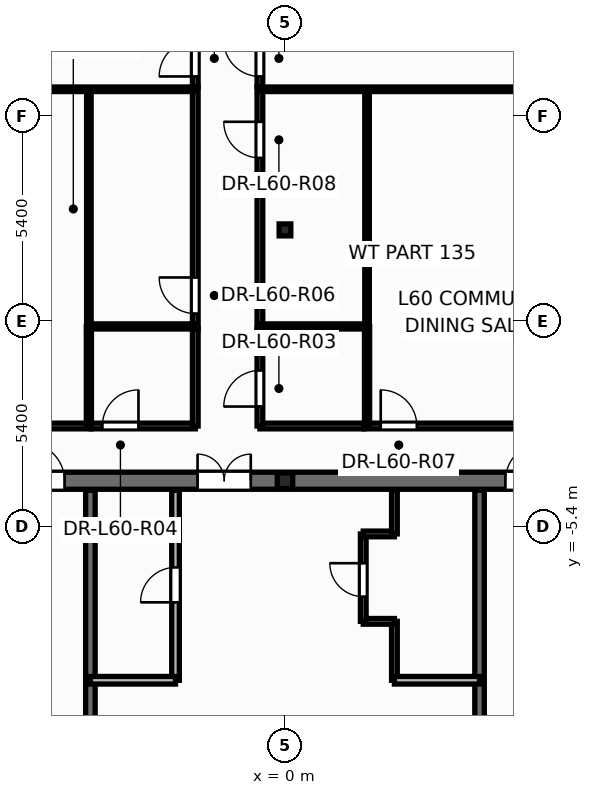
"""IFC4 building model, lengths in metres.
Left out: names, types, materials, properties, quantities, classifications, styles, units other than length and angle.
Written with IfcOpenShell. Run it as: python <this file> out.ifc"""

import sys

from ifc_helpers import new_model, si_unit, direction, frame, frame_2d, origin, origin_2d, place, context, subcontext, project, spatial, rectangle, i_section, extrude, element, fill, save


model = new_model("IFC4")
c1 = context("Model", 3, precision=1e-05, world=origin(), true_north=direction((0.0, 1.0)))
c2 = subcontext(c1, "Body", "Model", "MODEL_VIEW")
j1 = project(units=[si_unit("LENGTHUNIT", "METRE"), si_unit("PLANEANGLEUNIT", "RADIAN")], contexts=[c1])
p1 = place(None, origin())
s1 = spatial("IfcSite", under=j1, at=p1, CompositionType="ELEMENT")
p2 = place(p1, origin())
s2 = spatial("IfcBuilding", under=s1, at=p2, CompositionType="ELEMENT")
p3 = place(p2, frame((0.0, 0.0, 228.9)))
s3 = spatial("IfcBuildingStorey", under=s2, at=p3, CompositionType="ELEMENT", Elevation=228.9)
p4 = place(p3, frame((0.0, -4.2, 0.0), z_axis=(0.0, 0.0, 1.0), x_axis=(1.0, 0.0, 0.0)))
e1 = element("IfcColumn", 1, at=p4, inside=s3, PredefinedType="PILASTER", context=c2, shape_type="SweptSolid", body=[
    extrude(i_section(OverallWidth=0.405, OverallDepth=0.414, WebThickness=0.022, FlangeThickness=0.032, at=origin_2d()), origin(), (0.0, 0.0, 1.0), 4.5),
])
p5 = place(p3, frame((0.0, 2.4, 0.0), z_axis=(0.0, 0.0, 1.0), x_axis=(1.0, 0.0, 0.0)))
e2 = element("IfcColumn", 2, at=p5, inside=s3, PredefinedType="COLUMN", context=c2, shape_type="SweptSolid", body=[
    extrude(i_section(OverallWidth=0.307, OverallDepth=0.314, WebThickness=0.012, FlangeThickness=0.019, at=origin_2d()), origin(), (0.0, 0.0, 1.0), 4.5),
])
p6 = place(p3, frame((12.33, 0.896, -0.2), z_axis=(0.0, 0.0, 1.0), x_axis=(-0.583103601817, 0.812397802526, 0.0)))
e3 = element("IfcWall", 3, at=p6, inside=s3, PredefinedType="PARAPET", context=c2, shape_type="SweptSolid", body=[
    extrude(rectangle(XDim=15.574, YDim=0.36, at=frame_2d((7.787, 0.0))), origin(), (0.0, 0.0, 1.0), 0.38),
])
p7 = place(p3, frame((-3.248, 13.549, -0.2), z_axis=(0.0, 0.0, 1.0), x_axis=(-0.583104007924, -0.81239751104, 0.0)))
e4 = element("IfcWall", 4, at=p7, inside=s3, PredefinedType="PARAPET", context=c2, shape_type="SweptSolid", body=[
    extrude(rectangle(XDim=12.38, YDim=0.36, at=frame_2d((6.19, 0.0))), origin(), (0.0, 0.0, 1.0), 0.38),
])
p8 = place(p3, frame((2.88, -9.45, 0.0), z_axis=(0.0, 0.0, 1.0), x_axis=(0.0, 1.0, 0.0)))
e5 = element("IfcWall", 5, at=p8, inside=s3, PredefinedType="PARTITIONING", context=c2, shape_type="SweptSolid", body=[
    extrude(rectangle(XDim=1.55, YDim=0.15, at=frame_2d((0.775, 0.0))), origin(), (0.0, 0.0, 1.0), 4.245),
])
p9 = place(p3, frame((2.06, -7.9, 0.0), z_axis=(0.0, 0.0, 1.0), x_axis=(1.0, 0.0, 0.0)))
e6 = element("IfcWall", 6, at=p9, inside=s3, PredefinedType="PARTITIONING", context=c2, shape_type="SweptSolid", body=[
    extrude(rectangle(XDim=0.82, YDim=0.15, at=frame_2d((0.41, 0.0))), origin(), (0.0, 0.0, 1.0), 4.245),
])
p10 = place(p3, frame((2.06, -7.9, 0.0), z_axis=(0.0, 0.0, 1.0), x_axis=(0.0, 1.0, 0.0)))
e7 = element("IfcWall", 7, at=p10, inside=s3, PredefinedType="PARTITIONING", context=c2, shape_type="SweptSolid", body=[
    extrude(rectangle(XDim=2.3, YDim=0.15, at=frame_2d((1.15, 0.0))), origin(), (0.0, 0.0, 1.0), 4.245),
])
p11 = place(p10, frame((0.65, 0.0, 0.0)))
e8 = element("IfcOpeningElement", 8, at=p11, cuts=e7, PredefinedType="OPENING", context=c2, shape_type="SweptSolid", body=[
    extrude(rectangle(XDim=0.886, YDim=2.104, at=frame_2d((0.44, 1.052))), frame((0.0, 0.085, 0.0), z_axis=(0.0, -1.0, 0.0), x_axis=(1.0, 0.0, 0.0)), (0.0, 0.0, 1.0), 0.17),
])
p12 = place(p3, frame((2.06, -5.6, 0.0), z_axis=(0.0, 0.0, 1.0), x_axis=(1.0, 0.0, 0.0)))
e9 = element("IfcWall", 9, at=p12, inside=s3, PredefinedType="PARTITIONING", context=c2, shape_type="SweptSolid", body=[
    extrude(rectangle(XDim=0.82, YDim=0.15, at=frame_2d((0.41, 0.0))), origin(), (0.0, 0.0, 1.0), 4.245),
])
p13 = place(p3, frame((2.88, -5.6, 0.0), z_axis=(0.0, 0.0, 1.0), x_axis=(0.0, 1.0, 0.0)))
e10 = element("IfcWall", 10, at=p13, inside=s3, PredefinedType="PARTITIONING", context=c2, shape_type="SweptSolid", body=[
    extrude(rectangle(XDim=1.15, YDim=0.15, at=frame_2d((0.575, 0.0))), origin(), (0.0, 0.0, 1.0), 4.245),
])
p14 = place(p3, frame((-12.65, -4.2, 0.0), z_axis=(0.0, 0.0, 1.0), x_axis=(1.0, 0.0, 0.0)))
e11 = element("IfcWall", 11, at=p14, inside=s3, PredefinedType="SHEAR", context=c2, shape_type="SweptSolid", body=[
    extrude(rectangle(XDim=25.3, YDim=0.45, at=frame_2d((12.65, 0.0))), origin(), (0.0, 0.0, 1.0), 4.5),
])
p15 = place(p14, frame((1.85, 0.0, 0.0)))
e12 = element("IfcOpeningElement", 12, at=p15, cuts=e11, PredefinedType="OPENING", context=c2, shape_type="SweptSolid", body=[
    extrude(rectangle(XDim=0.756, YDim=2.054, at=frame_2d((0.375, 1.027))), frame((0.0, 0.235, 0.0), z_axis=(0.0, -1.0, 0.0), x_axis=(1.0, 0.0, 0.0)), (0.0, 0.0, 1.0), 0.47),
])
p16 = place(p14, frame((22.65, 0.0, 0.0)))
e13 = element("IfcOpeningElement", 13, at=p16, cuts=e11, PredefinedType="OPENING", context=c2, shape_type="SweptSolid", body=[
    extrude(rectangle(XDim=0.756, YDim=2.054, at=frame_2d((0.375, 1.027))), frame((0.0, 0.235, 0.0), z_axis=(0.0, -1.0, 0.0), x_axis=(1.0, 0.0, 0.0)), (0.0, 0.0, 1.0), 0.47),
])
p17 = place(p14, frame((5.85, 0.0, 0.0)))
e14 = element("IfcOpeningElement", 14, at=p17, cuts=e11, PredefinedType="OPENING", context=c2, shape_type="SweptSolid", body=[
    extrude(rectangle(XDim=1.006, YDim=2.104, at=frame_2d((0.5, 1.052))), frame((0.0, 0.235, 0.0), z_axis=(0.0, -1.0, 0.0), x_axis=(1.0, 0.0, 0.0)), (0.0, 0.0, 1.0), 0.47),
])
p18 = place(p14, frame((10.35, 0.0, 0.0)))
e15 = element("IfcOpeningElement", 15, at=p18, cuts=e11, PredefinedType="OPENING", context=c2, shape_type="SweptSolid", body=[
    extrude(rectangle(XDim=1.406, YDim=2.154, at=frame_2d((0.7, 1.077))), frame((0.0, 0.235, 0.0), z_axis=(0.0, -1.0, 0.0), x_axis=(1.0, 0.0, 0.0)), (0.0, 0.0, 1.0), 0.47),
])
p19 = place(p14, frame((18.45, 0.0, 0.0)))
e16 = element("IfcOpeningElement", 16, at=p19, cuts=e11, PredefinedType="OPENING", context=c2, shape_type="SweptSolid", body=[
    extrude(rectangle(XDim=1.006, YDim=2.104, at=frame_2d((0.5, 1.052))), frame((0.0, 0.235, 0.0), z_axis=(0.0, -1.0, 0.0), x_axis=(1.0, 0.0, 0.0)), (0.0, 0.0, 1.0), 0.47),
])
for number, where, z_axis, x_axis in (
    (17, (-5.12, -13.85, 0.0), (0.0, 0.0, 1.0), (0.0, 1.0, 0.0)),
    (18, (5.12, -13.85, 0.0), (0.0, 0.0, 1.0), (0.0, 1.0, 0.0)),
):
    element("IfcWall", number, at=place(p3, frame(where, z_axis=z_axis, x_axis=x_axis)), inside=s3, PredefinedType="SHEAR", context=c2, shape_type="SweptSolid", body=[
        extrude(rectangle(XDim=9.4, YDim=0.25, at=frame_2d((4.7, 0.0))), origin(), (0.0, 0.0, 1.0), 4.5),
    ])
p20 = place(p3, frame((-2.88, -9.45, 0.0), z_axis=(0.0, 0.0, 1.0), x_axis=(0.0, 1.0, 0.0)))
e19 = element("IfcWall", 19, at=p20, inside=s3, PredefinedType="SOLIDWALL", context=c2, shape_type="SweptSolid", body=[
    extrude(rectangle(XDim=5.0, YDim=0.2, at=frame_2d((2.5, 0.0))), origin(), (0.0, 0.0, 1.0), 4.245),
])
p21 = place(p20, frame((2.05, 0.0, 0.0)))
e20 = element("IfcOpeningElement", 20, at=p21, cuts=e19, PredefinedType="OPENING", context=c2, shape_type="SweptSolid", body=[
    extrude(rectangle(XDim=0.926, YDim=2.104, at=frame_2d((0.46, 1.052))), frame((0.0, 0.11, 0.0), z_axis=(0.0, -1.0, 0.0), x_axis=(1.0, 0.0, 0.0)), (0.0, 0.0, 1.0), 0.22),
])
for number, where, z_axis, x_axis in (
    (21, (-5.12, -9.45, 0.0), (0.0, 0.0, 1.0), (1.0, 0.0, 0.0)),
    (22, (2.88, -9.45, 0.0), (0.0, 0.0, 1.0), (1.0, 0.0, 0.0)),
):
    element("IfcWall", number, at=place(p3, frame(where, z_axis=z_axis, x_axis=x_axis)), inside=s3, PredefinedType="SOLIDWALL", context=c2, shape_type="SweptSolid", body=[
        extrude(rectangle(XDim=2.24, YDim=0.2, at=frame_2d((1.12, 0.0))), origin(), (0.0, 0.0, 1.0), 4.245),
    ])
p22 = place(p3, frame((2.08, -2.76, 0.0), z_axis=(0.0, 0.0, 1.0), x_axis=(1.0, 0.0, 0.0)))
e23 = element("IfcWall", 23, at=p22, inside=s3, PredefinedType="PARTITIONING", context=c2, shape_type="SweptSolid", body=[
    extrude(rectangle(XDim=12.677, YDim=0.15, at=frame_2d((6.339, 0.0))), origin(), (0.0, 0.0, 1.0), 3.22),
])
p23 = place(p22, frame((0.44, 0.0, 0.0)))
e24 = element("IfcOpeningElement", 24, at=p23, cuts=e23, PredefinedType="OPENING", context=c2, shape_type="SweptSolid", body=[
    extrude(rectangle(XDim=0.956, YDim=2.104, at=frame_2d((0.475, 1.052))), frame((0.0, 0.085, 0.0), z_axis=(0.0, -1.0, 0.0), x_axis=(1.0, 0.0, 0.0)), (0.0, 0.0, 1.0), 0.17),
])
p24 = place(p3, frame((-14.757, -2.76, 0.0), z_axis=(0.0, 0.0, 1.0), x_axis=(1.0, 0.0, 0.0)))
e25 = element("IfcWall", 25, at=p24, inside=s3, PredefinedType="PARTITIONING", context=c2, shape_type="SweptSolid", body=[
    extrude(rectangle(XDim=9.657, YDim=0.15, at=frame_2d((4.829, 0.0))), origin(), (0.0, 0.0, 1.0), 3.22),
])
p25 = place(p24, frame((3.885, 0.0, 0.0)))
e26 = element("IfcOpeningElement", 26, at=p25, cuts=e25, PredefinedType="OPENING", context=c2, shape_type="SweptSolid", body=[
    extrude(rectangle(XDim=0.956, YDim=2.104, at=frame_2d((0.475, 1.052))), frame((0.0, 0.085, 0.0), z_axis=(0.0, -1.0, 0.0), x_axis=(1.0, 0.0, 0.0)), (0.0, 0.0, 1.0), 0.17),
])
p26 = place(p3, frame((-2.36, -0.2, 0.0), z_axis=(0.0, 0.0, 1.0), x_axis=(0.0, 1.0, 0.0)))
e27 = element("IfcWall", 27, at=p26, inside=s3, PredefinedType="PARTITIONING", context=c2, shape_type="SweptSolid", body=[
    extrude(rectangle(XDim=6.36, YDim=0.15, at=frame_2d((3.18, 0.0))), origin(), (0.0, 0.0, 1.0), 3.22),
])
p27 = place(p26, frame((0.398, 0.0, 0.0)))
e28 = element("IfcOpeningElement", 28, at=p27, cuts=e27, PredefinedType="OPENING", context=c2, shape_type="SweptSolid", body=[
    extrude(rectangle(XDim=0.956, YDim=2.104, at=frame_2d((0.475, 1.052))), frame((0.0, 0.085, 0.0), z_axis=(0.0, -1.0, 0.0), x_axis=(1.0, 0.0, 0.0)), (0.0, 0.0, 1.0), 0.17),
])
p28 = place(p3, frame((-0.66, -0.2, 0.0), z_axis=(0.0, 0.0, 1.0), x_axis=(0.0, 1.0, 0.0)))
e29 = element("IfcWall", 29, at=p28, inside=s3, PredefinedType="PARTITIONING", context=c2, shape_type="SweptSolid", body=[
    extrude(rectangle(XDim=6.36, YDim=0.15, at=frame_2d((3.18, 0.0))), origin(), (0.0, 0.0, 1.0), 3.22),
])
p29 = place(p28, frame((4.495, 0.0, 0.0)))
e30 = element("IfcOpeningElement", 30, at=p29, cuts=e29, PredefinedType="OPENING", context=c2, shape_type="SweptSolid", body=[
    extrude(rectangle(XDim=0.956, YDim=2.104, at=frame_2d((0.475, 1.052))), frame((0.0, 0.085, 0.0), z_axis=(0.0, -1.0, 0.0), x_axis=(1.0, 0.0, 0.0)), (0.0, 0.0, 1.0), 0.17),
])
for number, where, z_axis, x_axis in (
    (31, (-5.16, -0.2, 0.0), (0.0, 0.0, 1.0), (0.0, 1.0, 0.0)),
    (32, (2.16, -0.2, 0.0), (0.0, 0.0, 1.0), (0.0, 1.0, 0.0)),
):
    element("IfcWall", number, at=place(p3, frame(where, z_axis=z_axis, x_axis=x_axis)), inside=s3, PredefinedType="PARTITIONING", context=c2, shape_type="SweptSolid", body=[
        extrude(rectangle(XDim=6.3, YDim=0.12, at=frame_2d((3.15, 0.0))), origin(), (0.0, 0.0, 1.0), 3.22),
    ])
p30 = place(p3, frame((-0.66, 6.1, 0.0), z_axis=(0.0, 0.0, 1.0), x_axis=(1.0, 0.0, 0.0)))
e33 = element("IfcWall", 33, at=p30, inside=s3, PredefinedType="PARTITIONING", context=c2, shape_type="SweptSolid", body=[
    extrude(rectangle(XDim=9.058, YDim=0.12, at=frame_2d((4.529, 0.0))), origin(), (0.0, 0.0, 1.0), 3.22),
])
p31 = place(p3, frame((-8.398, 6.1, 0.0), z_axis=(0.0, 0.0, 1.0), x_axis=(1.0, 0.0, 0.0)))
e34 = element("IfcWall", 34, at=p31, inside=s3, PredefinedType="PARTITIONING", context=c2, shape_type="SweptSolid", body=[
    extrude(rectangle(XDim=6.038, YDim=0.12, at=frame_2d((3.019, 0.0))), origin(), (0.0, 0.0, 1.0), 3.22),
])
p32 = place(p3, frame((-0.66, -2.76, 0.0), z_axis=(0.0, 0.0, 1.0), x_axis=(1.0, 0.0, 0.0)))
e35 = element("IfcWall", 35, at=p32, inside=s3, PredefinedType="PARTITIONING", context=c2, shape_type="SweptSolid", body=[
    extrude(rectangle(XDim=2.738, YDim=0.15, at=frame_2d((1.369, 0.0))), origin(), (0.0, 0.0, 1.0), 3.22),
])
p33 = place(p3, frame((-5.098, -2.76, 0.0), z_axis=(0.0, 0.0, 1.0), x_axis=(1.0, 0.0, 0.0)))
e36 = element("IfcWall", 36, at=p33, inside=s3, PredefinedType="PARTITIONING", context=c2, shape_type="SweptSolid", body=[
    extrude(rectangle(XDim=2.738, YDim=0.15, at=frame_2d((1.369, 0.0))), origin(), (0.0, 0.0, 1.0), 3.865),
])
p34 = place(p33, frame((0.293, 0.0, 0.0)))
e37 = element("IfcOpeningElement", 37, at=p34, cuts=e36, PredefinedType="OPENING", context=c2, shape_type="SweptSolid", body=[
    extrude(rectangle(XDim=0.956, YDim=2.104, at=frame_2d((0.475, 1.052))), frame((0.0, 0.085, 0.0), z_axis=(0.0, -1.0, 0.0), x_axis=(1.0, 0.0, 0.0)), (0.0, 0.0, 1.0), 0.17),
])
p35 = place(p3, frame((-0.66, -0.14, 0.0), z_axis=(0.0, 0.0, 1.0), x_axis=(1.0, 0.0, 0.0)))
e38 = element("IfcWall", 38, at=p35, inside=s3, PredefinedType="PARTITIONING", context=c2, shape_type="SweptSolid", body=[
    extrude(rectangle(XDim=2.82, YDim=0.135, at=frame_2d((1.41, 0.0))), origin(), (0.0, 0.0, 1.0), 3.22),
])
p36 = place(p3, frame((-5.16, -0.14, 0.0), z_axis=(0.0, 0.0, 1.0), x_axis=(1.0, 0.0, 0.0)))
e39 = element("IfcWall", 39, at=p36, inside=s3, PredefinedType="PARTITIONING", context=c2, shape_type="SweptSolid", body=[
    extrude(rectangle(XDim=2.8, YDim=0.135, at=frame_2d((1.4, 0.0))), origin(), (0.0, 0.0, 1.0), 3.865),
])
p37 = place(p3, frame((-0.66, -2.76, 0.0), z_axis=(0.0, 0.0, 1.0), x_axis=(0.0, 1.0, 0.0)))
e40 = element("IfcWall", 40, at=p37, inside=s3, PredefinedType="PARTITIONING", context=c2, shape_type="SweptSolid", body=[
    extrude(rectangle(XDim=2.558, YDim=0.15, at=frame_2d((1.279, 0.0))), origin(), (0.0, 0.0, 1.0), 4.245),
])
p38 = place(p37, frame((0.512, 0.0, 0.0)))
e41 = element("IfcOpeningElement", 41, at=p38, cuts=e40, PredefinedType="OPENING", context=c2, shape_type="SweptSolid", body=[
    extrude(rectangle(XDim=0.956, YDim=2.104, at=frame_2d((0.475, 1.052))), frame((0.0, 0.085, 0.0), z_axis=(0.0, -1.0, 0.0), x_axis=(1.0, 0.0, 0.0)), (0.0, 0.0, 1.0), 0.17),
])
p39 = place(p3, frame((-2.36, -2.76, 0.0), z_axis=(0.0, 0.0, 1.0), x_axis=(0.0, 1.0, 0.0)))
e42 = element("IfcWall", 42, at=p39, inside=s3, PredefinedType="PARTITIONING", context=c2, shape_type="SweptSolid", body=[
    extrude(rectangle(XDim=2.558, YDim=0.15, at=frame_2d((1.279, 0.0))), origin(), (0.0, 0.0, 1.0), 4.245),
])
for number, where, z_axis, x_axis in (
    (43, (2.16, -2.76, 0.0), (0.0, 0.0, 1.0), (0.0, 1.0, 0.0)),
    (44, (-5.16, -2.76, 0.0), (0.0, 0.0, 1.0), (0.0, 1.0, 0.0)),
):
    element("IfcWall", number, at=place(p3, frame(where, z_axis=z_axis, x_axis=x_axis)), inside=s3, PredefinedType="PARTITIONING", context=c2, shape_type="SweptSolid", body=[
        extrude(rectangle(XDim=2.62, YDim=0.135, at=frame_2d((1.31, 0.0))), origin(), (0.0, 0.0, 1.0), 4.245),
    ])
p40 = place(p3, frame((-2.36, 6.162, 0.0), z_axis=(0.0, 0.0, 1.0), x_axis=(0.0, 1.0, 0.0)))
e45 = element("IfcWall", 45, at=p40, inside=s3, PredefinedType="PARTITIONING", context=c2, shape_type="SweptSolid", body=[
    extrude(rectangle(XDim=2.138, YDim=0.15, at=frame_2d((1.069, 0.0))), origin(), (0.0, 0.0, 1.0), 3.22),
])
p41 = place(p40, frame((0.275, 0.0, 0.0)))
e46 = element("IfcOpeningElement", 46, at=p41, cuts=e45, PredefinedType="OPENING", context=c2, shape_type="SweptSolid", body=[
    extrude(rectangle(XDim=0.956, YDim=2.104, at=frame_2d((0.475, 1.052))), frame((0.0, 0.085, 0.0), z_axis=(0.0, -1.0, 0.0), x_axis=(1.0, 0.0, 0.0)), (0.0, 0.0, 1.0), 0.17),
])
p42 = place(p3, frame((-0.66, 6.162, 0.0), z_axis=(0.0, 0.0, 1.0), x_axis=(0.0, 1.0, 0.0)))
e47 = element("IfcWall", 47, at=p42, inside=s3, PredefinedType="PARTITIONING", context=c2, shape_type="SweptSolid", body=[
    extrude(rectangle(XDim=2.138, YDim=0.15, at=frame_2d((1.069, 0.0))), origin(), (0.0, 0.0, 1.0), 3.22),
])
p43 = place(p42, frame((0.275, 0.0, 0.0)))
e48 = element("IfcOpeningElement", 48, at=p43, cuts=e47, PredefinedType="OPENING", context=c2, shape_type="SweptSolid", body=[
    extrude(rectangle(XDim=0.956, YDim=2.104, at=frame_2d((0.475, 1.052))), frame((0.0, 0.085, 0.0), z_axis=(0.0, -1.0, 0.0), x_axis=(1.0, 0.0, 0.0)), (0.0, 0.0, 1.0), 0.17),
])
p44 = place(p21, origin())
e49 = element("IfcDoor", 49, at=p44, inside=s3, OperationType="SINGLE_SWING_LEFT", PredefinedType="DOOR", context=c2, shape_type="SweptSolid", body=[
    extrude(rectangle(XDim=0.92, YDim=2.1, at=frame_2d((0.46, 1.05))), frame((0.0, 0.025, 0.0), z_axis=(0.0, -1.0, 0.0), x_axis=(1.0, 0.0, 0.0)), (0.0, 0.0, 1.0), 0.05),
])
fill(e20, e49)
p45 = place(p11, origin())
e50 = element("IfcDoor", 50, at=p45, inside=s3, OperationType="SINGLE_SWING_RIGHT", PredefinedType="DOOR", context=c2, shape_type="SweptSolid", body=[
    extrude(rectangle(XDim=0.88, YDim=2.1, at=frame_2d((0.44, 1.05))), frame((0.0, 0.025, 0.0), z_axis=(0.0, -1.0, 0.0), x_axis=(1.0, 0.0, 0.0)), (0.0, 0.0, 1.0), 0.05),
])
fill(e8, e50)
p46 = place(p17, origin())
e51 = element("IfcDoor", 51, at=p46, inside=s3, OperationType="SINGLE_SWING_LEFT", PredefinedType="DOOR", context=c2, shape_type="SweptSolid", body=[
    extrude(rectangle(XDim=1.0, YDim=2.1, at=frame_2d((0.5, 1.05))), frame((0.0, 0.025, 0.0), z_axis=(0.0, -1.0, 0.0), x_axis=(1.0, 0.0, 0.0)), (0.0, 0.0, 1.0), 0.05),
])
fill(e14, e51)
p47 = place(p18, origin())
e52 = element("IfcDoor", 52, at=p47, inside=s3, OperationType="DOUBLE_DOOR_SINGLE_SWING", PredefinedType="DOOR", context=c2, shape_type="SweptSolid", body=[
    extrude(rectangle(XDim=1.4, YDim=2.15, at=frame_2d((0.7, 1.075))), frame((0.0, 0.025, 0.0), z_axis=(0.0, -1.0, 0.0), x_axis=(1.0, 0.0, 0.0)), (0.0, 0.0, 1.0), 0.05),
])
fill(e15, e52)
p48 = place(p19, origin())
e53 = element("IfcDoor", 53, at=p48, inside=s3, OperationType="SINGLE_SWING_RIGHT", PredefinedType="DOOR", context=c2, shape_type="SweptSolid", body=[
    extrude(rectangle(XDim=1.0, YDim=2.1, at=frame_2d((0.5, 1.05))), frame((0.0, 0.025, 0.0), z_axis=(0.0, -1.0, 0.0), x_axis=(1.0, 0.0, 0.0)), (0.0, 0.0, 1.0), 0.05),
])
fill(e16, e53)
p49 = place(p38, origin())
e54 = element("IfcDoor", 54, at=p49, inside=s3, OperationType="SINGLE_SWING_LEFT", PredefinedType="DOOR", context=c2, shape_type="SweptSolid", body=[
    extrude(rectangle(XDim=0.95, YDim=2.1, at=frame_2d((0.475, 1.05))), frame((0.0, 0.025, 0.0), z_axis=(0.0, -1.0, 0.0), x_axis=(1.0, 0.0, 0.0)), (0.0, 0.0, 1.0), 0.05),
])
fill(e41, e54)
p50 = place(p34, origin())
e55 = element("IfcDoor", 55, at=p50, inside=s3, OperationType="SINGLE_SWING_RIGHT", PredefinedType="DOOR", context=c2, shape_type="SweptSolid", body=[
    extrude(rectangle(XDim=0.95, YDim=2.1, at=frame_2d((0.475, 1.05))), frame((0.0, 0.025, 0.0), z_axis=(0.0, -1.0, 0.0), x_axis=(1.0, 0.0, 0.0)), (0.0, 0.0, 1.0), 0.05),
])
fill(e37, e55)
p51 = place(p27, origin())
e56 = element("IfcDoor", 56, at=p51, inside=s3, OperationType="SINGLE_SWING_RIGHT", PredefinedType="DOOR", context=c2, shape_type="SweptSolid", body=[
    extrude(rectangle(XDim=0.95, YDim=2.1, at=frame_2d((0.475, 1.05))), frame((0.0, 0.025, 0.0), z_axis=(0.0, -1.0, 0.0), x_axis=(1.0, 0.0, 0.0)), (0.0, 0.0, 1.0), 0.05),
])
fill(e28, e56)
p52 = place(p23, origin())
e57 = element("IfcDoor", 57, at=p52, inside=s3, OperationType="SINGLE_SWING_LEFT", PredefinedType="DOOR", context=c2, shape_type="SweptSolid", body=[
    extrude(rectangle(XDim=0.95, YDim=2.1, at=frame_2d((0.475, 1.05))), frame((0.0, 0.025, 0.0), z_axis=(0.0, -1.0, 0.0), x_axis=(1.0, 0.0, 0.0)), (0.0, 0.0, 1.0), 0.05),
])
fill(e24, e57)
p53 = place(p29, origin())
e58 = element("IfcDoor", 58, at=p53, inside=s3, OperationType="SINGLE_SWING_RIGHT", PredefinedType="DOOR", context=c2, shape_type="SweptSolid", body=[
    extrude(rectangle(XDim=0.95, YDim=2.1, at=frame_2d((0.475, 1.05))), frame((0.0, 0.025, 0.0), z_axis=(0.0, -1.0, 0.0), x_axis=(1.0, 0.0, 0.0)), (0.0, 0.0, 1.0), 0.05),
])
fill(e30, e58)
p54 = place(p41, origin())
e59 = element("IfcDoor", 59, at=p54, inside=s3, OperationType="SINGLE_SWING_LEFT", PredefinedType="DOOR", context=c2, shape_type="SweptSolid", body=[
    extrude(rectangle(XDim=0.95, YDim=2.1, at=frame_2d((0.475, 1.05))), frame((0.0, 0.025, 0.0), z_axis=(0.0, -1.0, 0.0), x_axis=(1.0, 0.0, 0.0)), (0.0, 0.0, 1.0), 0.05),
])
fill(e46, e59)
p55 = place(p43, origin())
e60 = element("IfcDoor", 60, at=p55, inside=s3, OperationType="SINGLE_SWING_RIGHT", PredefinedType="DOOR", context=c2, shape_type="SweptSolid", body=[
    extrude(rectangle(XDim=0.95, YDim=2.1, at=frame_2d((0.475, 1.05))), frame((0.0, 0.025, 0.0), z_axis=(0.0, -1.0, 0.0), x_axis=(1.0, 0.0, 0.0)), (0.0, 0.0, 1.0), 0.05),
])
fill(e48, e60)
save(model, sys.argv[1])
